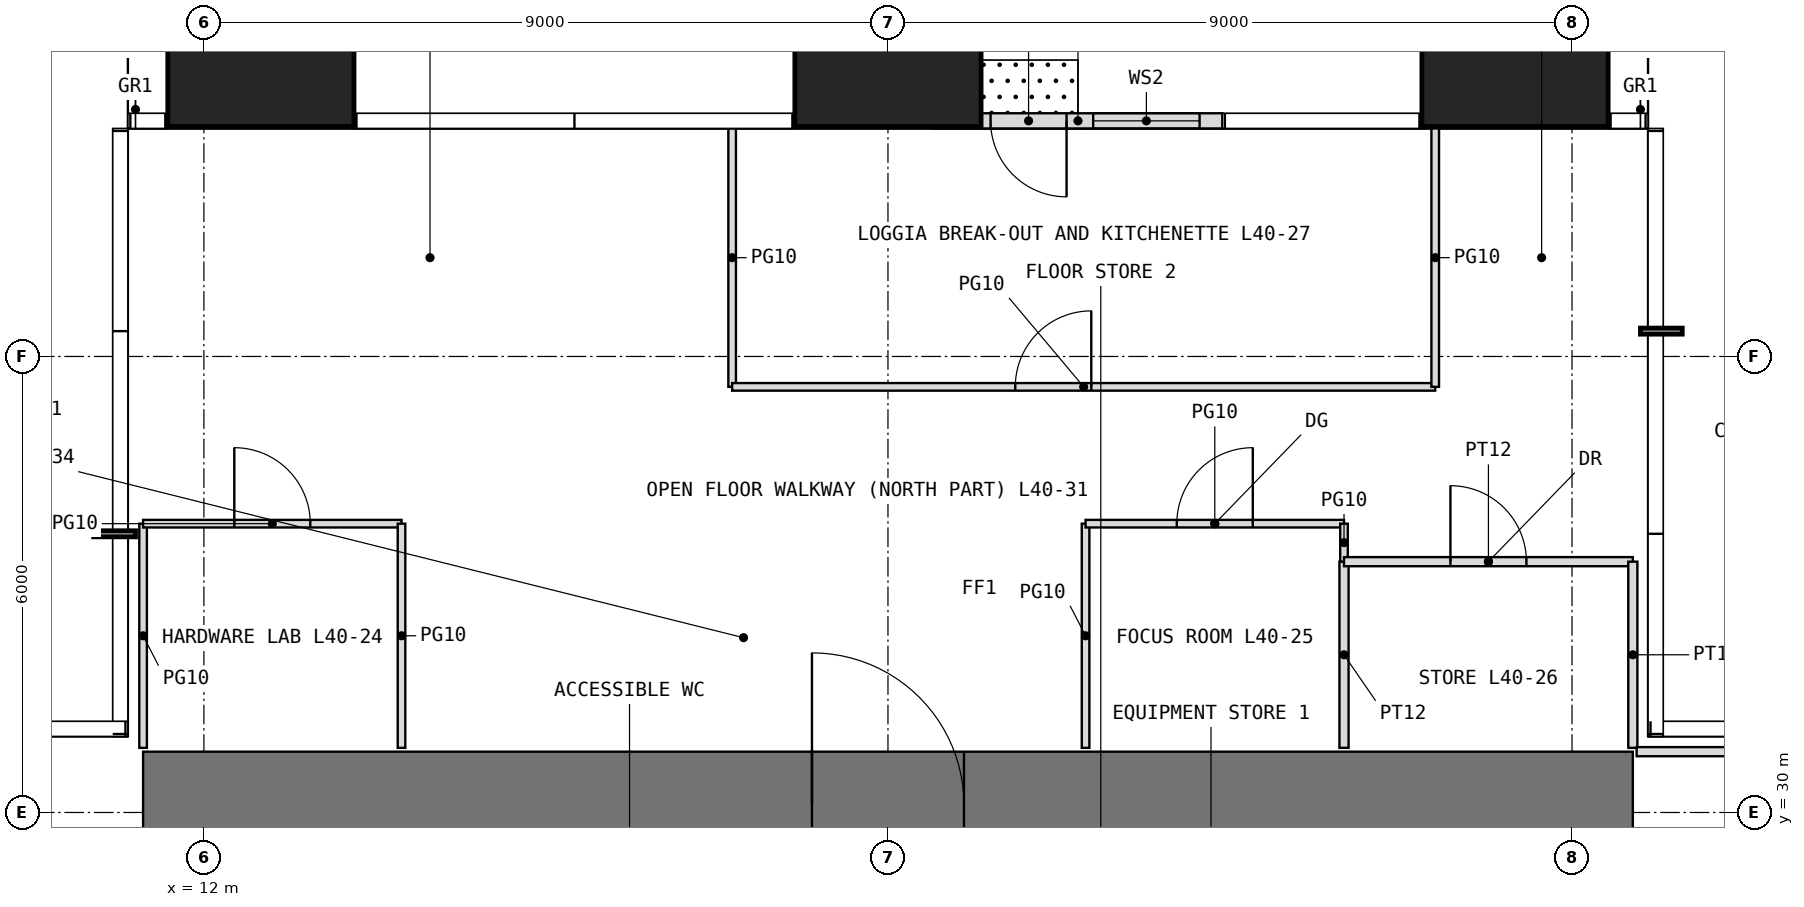
"""IFC4 building model, lengths in metres.
Left out: names, types, materials, properties, quantities, classifications, styles, units other than length and angle.
Written with IfcOpenShell. Run it as: python <this file> out.ifc"""

import sys

from ifc_helpers import new_model, si_unit, direction, frame, frame_2d, origin, origin_2d, place, context, subcontext, project, spatial, rectangle, extrude, element, fill, save


model = new_model("IFC4")
c1 = context("Model", 3, precision=1e-05, world=origin(), true_north=direction((0.0, 1.0)))
c2 = subcontext(c1, "Body", "Model", "MODEL_VIEW")
j1 = project(units=[si_unit("LENGTHUNIT", "METRE"), si_unit("PLANEANGLEUNIT", "RADIAN")], contexts=[c1])
p1 = place(None, origin())
s1 = spatial("IfcSite", under=j1, at=p1, CompositionType="ELEMENT")
p2 = place(p1, origin())
s2 = spatial("IfcBuilding", under=s1, at=p2, CompositionType="ELEMENT")
p3 = place(p2, frame((0.0, 0.0, 170.5)))
s3 = spatial("IfcBuildingStorey", under=s2, at=p3, CompositionType="ELEMENT", Elevation=170.5)
for number, where, z_axis, x_axis in (
    (1, (12.75, 40.25, 0.0), (0.0, 0.0, 1.0), (1.0, 0.0, 0.0)),
    (2, (21.0, 40.25, 0.0), (0.0, 0.0, 1.0), (1.0, 0.0, 0.0)),
    (3, (29.25, 40.25, 0.0), (0.0, 0.0, 1.0), (1.0, 0.0, 0.0)),
):
    element("IfcColumn", number, at=place(p3, frame(where, z_axis=z_axis, x_axis=x_axis)), inside=s3, PredefinedType="COLUMN", context=c2, shape_type="SweptSolid", body=[
        extrude(rectangle(XDim=2.45, YDim=2.45, at=origin_2d()), origin(), (0.0, 0.0, 1.0), 4.0),
    ])
p4 = place(p3, frame((25.4, 39.1, 0.0), z_axis=(0.0, 0.0, 1.0), x_axis=(-1.0, 0.0, 0.0)))
e4 = element("IfcWall", 4, at=p4, inside=s3, PredefinedType="USERDEFINED", context=c2, shape_type="SweptSolid", body=[
    extrude(rectangle(XDim=3.8, YDim=0.2, at=frame_2d((1.9, 0.0))), origin(), (0.0, 0.0, 1.0), 3.75),
])
p5 = place(p4, frame((2.05, 0.0, 0.0)))
e5 = element("IfcOpeningElement", 5, at=p5, cuts=e4, PredefinedType="OPENING", context=c2, shape_type="SweptSolid", body=[
    extrude(rectangle(XDim=1.0, YDim=2.4, at=frame_2d((0.5, 1.2))), frame((0.0, 0.11, 0.0), z_axis=(0.0, -1.0, 0.0), x_axis=(1.0, 0.0, 0.0)), (0.0, 0.0, 1.0), 0.22),
])
p6 = place(p4, frame((0.3, 0.0, 0.3)))
e6 = element("IfcOpeningElement", 6, at=p6, cuts=e4, PredefinedType="OPENING", context=c2, shape_type="SweptSolid", body=[
    extrude(rectangle(XDim=1.4, YDim=2.7, at=frame_2d((0.7, 1.35))), frame((0.0, 0.11, 0.0), z_axis=(0.0, -1.0, 0.0), x_axis=(1.0, 0.0, 0.0)), (0.0, 0.0, 1.0), 0.22),
])
p7 = place(p3, frame((11.2, 30.1, -0.05), z_axis=(0.0, 0.0, 1.0), x_axis=(1.0, 0.0, 0.0)))
e7 = element("IfcWall", 7, at=p7, inside=s3, PredefinedType="SHEAR", context=c2, shape_type="SweptSolid", body=[
    extrude(rectangle(XDim=19.6, YDim=1.4, at=frame_2d((9.8, 0.0))), origin(), (0.0, 0.0, 1.0), 4.0),
])
p8 = place(p7, frame((8.8, 0.0, 0.05)))
e8 = element("IfcOpeningElement", 8, at=p8, cuts=e7, PredefinedType="OPENING", context=c2, shape_type="SweptSolid", body=[
    extrude(rectangle(XDim=2.0, YDim=2.2, at=frame_2d((1.0, 1.1))), frame((0.0, 0.71, 0.0), z_axis=(0.0, -1.0, 0.0), x_axis=(1.0, 0.0, 0.0)), (0.0, 0.0, 1.0), 1.42),
])
p9 = place(p3, frame((11.2, 30.85, 0.0), z_axis=(0.0, 0.0, 1.0), x_axis=(0.0, 1.0, 0.0)))
e9 = element("IfcWall", 9, at=p9, inside=s3, PredefinedType="PARTITIONING", context=c2, shape_type="SweptSolid", body=[
    extrude(rectangle(XDim=2.95, YDim=0.1, at=frame_2d((1.475, 0.0))), origin(), (0.0, 0.0, 1.0), 3.75),
])
p10 = place(p3, frame((11.2, 33.8, 0.0), z_axis=(0.0, 0.0, 1.0), x_axis=(1.0, 0.0, 0.0)))
e10 = element("IfcWall", 10, at=p10, inside=s3, PredefinedType="PARTITIONING", context=c2, shape_type="SweptSolid", body=[
    extrude(rectangle(XDim=3.4, YDim=0.1, at=frame_2d((1.7, 0.0))), origin(), (0.0, 0.0, 1.0), 3.75),
])
p11 = place(p10, frame((1.2, 0.0, 0.0)))
e11 = element("IfcOpeningElement", 11, at=p11, cuts=e10, PredefinedType="OPENING", context=c2, shape_type="SweptSolid", body=[
    extrude(rectangle(XDim=1.0, YDim=2.4, at=frame_2d((0.5, 1.2))), frame((0.0, 0.06, 0.0), z_axis=(0.0, -1.0, 0.0), x_axis=(1.0, 0.0, 0.0)), (0.0, 0.0, 1.0), 0.12),
])
p12 = place(p3, frame((14.6, 30.85, 0.0), z_axis=(0.0, 0.0, 1.0), x_axis=(0.0, 1.0, 0.0)))
e12 = element("IfcWall", 12, at=p12, inside=s3, PredefinedType="PARTITIONING", context=c2, shape_type="SweptSolid", body=[
    extrude(rectangle(XDim=2.95, YDim=0.1, at=frame_2d((1.475, 0.0))), origin(), (0.0, 0.0, 1.0), 3.75),
])
p13 = place(p3, frame((18.95, 35.6, 0.0), z_axis=(0.0, 0.0, 1.0), x_axis=(0.0, 1.0, 0.0)))
e13 = element("IfcWall", 13, at=p13, inside=s3, PredefinedType="PARTITIONING", context=c2, shape_type="SweptSolid", body=[
    extrude(rectangle(XDim=3.4, YDim=0.1, at=frame_2d((1.7, 0.0))), origin(), (0.0, 0.0, 1.0), 3.75),
])
p14 = place(p3, frame((18.95, 35.6, 0.0), z_axis=(0.0, 0.0, 1.0), x_axis=(1.0, 0.0, 0.0)))
e14 = element("IfcWall", 14, at=p14, inside=s3, PredefinedType="PARTITIONING", context=c2, shape_type="SweptSolid", body=[
    extrude(rectangle(XDim=9.25, YDim=0.1, at=frame_2d((4.625, 0.0))), origin(), (0.0, 0.0, 1.0), 3.75),
])
p15 = place(p14, frame((3.725, 0.0, 0.0)))
e15 = element("IfcOpeningElement", 15, at=p15, cuts=e14, PredefinedType="OPENING", context=c2, shape_type="SweptSolid", body=[
    extrude(rectangle(XDim=1.0, YDim=2.4, at=frame_2d((0.5, 1.2))), frame((0.0, 0.06, 0.0), z_axis=(0.0, -1.0, 0.0), x_axis=(1.0, 0.0, 0.0)), (0.0, 0.0, 1.0), 0.12),
])
p16 = place(p3, frame((23.6, 30.85, 0.0), z_axis=(0.0, 0.0, 1.0), x_axis=(0.0, 1.0, 0.0)))
e16 = element("IfcWall", 16, at=p16, inside=s3, PredefinedType="PARTITIONING", context=c2, shape_type="SweptSolid", body=[
    extrude(rectangle(XDim=2.95, YDim=0.1, at=frame_2d((1.475, 0.0))), origin(), (0.0, 0.0, 1.0), 3.75),
])
p17 = place(p3, frame((23.6, 33.8, 0.0), z_axis=(0.0, 0.0, 1.0), x_axis=(1.0, 0.0, 0.0)))
e17 = element("IfcWall", 17, at=p17, inside=s3, PredefinedType="PARTITIONING", context=c2, shape_type="SweptSolid", body=[
    extrude(rectangle(XDim=3.4, YDim=0.1, at=frame_2d((1.7, 0.0))), origin(), (0.0, 0.0, 1.0), 3.75),
])
p18 = place(p17, frame((1.2, 0.0, 0.0)))
e18 = element("IfcOpeningElement", 18, at=p18, cuts=e17, PredefinedType="OPENING", context=c2, shape_type="SweptSolid", body=[
    extrude(rectangle(XDim=1.0, YDim=2.4, at=frame_2d((0.5, 1.2))), frame((0.0, 0.06, 0.0), z_axis=(0.0, -1.0, 0.0), x_axis=(1.0, 0.0, 0.0)), (0.0, 0.0, 1.0), 0.12),
])
p19 = place(p3, frame((27.0, 30.85, 0.0), z_axis=(0.0, 0.0, 1.0), x_axis=(0.0, 1.0, 0.0)))
e19 = element("IfcWall", 19, at=p19, inside=s3, PredefinedType="PARTITIONING", context=c2, shape_type="SweptSolid", body=[
    extrude(rectangle(XDim=2.45, YDim=0.12, at=frame_2d((1.225, 0.0))), origin(), (0.0, 0.0, 1.0), 3.75),
])
p20 = place(p3, frame((27.0, 33.3, 0.0), z_axis=(0.0, 0.0, 1.0), x_axis=(0.0, 1.0, 0.0)))
e20 = element("IfcWall", 20, at=p20, inside=s3, PredefinedType="PARTITIONING", context=c2, shape_type="SweptSolid", body=[
    extrude(rectangle(XDim=0.5, YDim=0.1, at=frame_2d((0.25, 0.0))), origin(), (0.0, 0.0, 1.0), 3.75),
])
p21 = place(p3, frame((27.0, 33.3, 0.0), z_axis=(0.0, 0.0, 1.0), x_axis=(1.0, 0.0, 0.0)))
e21 = element("IfcWall", 21, at=p21, inside=s3, PredefinedType="PARTITIONING", context=c2, shape_type="SweptSolid", body=[
    extrude(rectangle(XDim=3.8, YDim=0.12, at=frame_2d((1.9, 0.0))), origin(), (0.0, 0.0, 1.0), 3.75),
])
p22 = place(p21, frame((1.4, 0.0, 0.0)))
e22 = element("IfcOpeningElement", 22, at=p22, cuts=e21, PredefinedType="OPENING", context=c2, shape_type="SweptSolid", body=[
    extrude(rectangle(XDim=1.0, YDim=2.2, at=frame_2d((0.5, 1.1))), frame((0.0, 0.07, 0.0), z_axis=(0.0, -1.0, 0.0), x_axis=(1.0, 0.0, 0.0)), (0.0, 0.0, 1.0), 0.14),
])
p23 = place(p3, frame((28.2, 35.6, 0.0), z_axis=(0.0, 0.0, 1.0), x_axis=(0.0, 1.0, 0.0)))
e23 = element("IfcWall", 23, at=p23, inside=s3, PredefinedType="PARTITIONING", context=c2, shape_type="SweptSolid", body=[
    extrude(rectangle(XDim=3.4, YDim=0.1, at=frame_2d((1.7, 0.0))), origin(), (0.0, 0.0, 1.0), 3.75),
])
p24 = place(p3, frame((30.8, 30.85, 0.0), z_axis=(0.0, 0.0, 1.0), x_axis=(0.0, 1.0, 0.0)))
e24 = element("IfcWall", 24, at=p24, inside=s3, PredefinedType="PARTITIONING", context=c2, shape_type="SweptSolid", body=[
    extrude(rectangle(XDim=2.45, YDim=0.12, at=frame_2d((1.225, 0.0))), origin(), (0.0, 0.0, 1.0), 3.75),
])
p25 = place(p3, frame((30.85, 30.8, 0.0), z_axis=(0.0, 0.0, 1.0), x_axis=(1.0, 0.0, 0.0)))
e25 = element("IfcWall", 25, at=p25, inside=s3, PredefinedType="PARTITIONING", context=c2, shape_type="SweptSolid", body=[
    extrude(rectangle(XDim=4.85, YDim=0.12, at=frame_2d((2.425, 0.0))), origin(), (0.0, 0.0, 1.0), 3.75),
])
p26 = place(p5, origin())
e26 = element("IfcDoor", 26, at=p26, inside=s3, OperationType="SINGLE_SWING_LEFT", PredefinedType="DOOR", context=c2, shape_type="SweptSolid", body=[
    extrude(rectangle(XDim=1.0, YDim=2.4, at=frame_2d((0.5, 1.2))), frame((0.0, 0.025, 0.0), z_axis=(0.0, -1.0, 0.0), x_axis=(1.0, 0.0, 0.0)), (0.0, 0.0, 1.0), 0.05),
])
fill(e5, e26)
p27 = place(p6, origin())
e27 = element("IfcWindow", 27, at=p27, inside=s3, PartitioningType="SINGLE_PANEL", PredefinedType="WINDOW", context=c2, shape_type="SweptSolid", body=[
    extrude(rectangle(XDim=1.4, YDim=2.7, at=frame_2d((0.7, 1.35))), frame((0.0, 0.03, 0.0), z_axis=(0.0, -1.0, 0.0), x_axis=(1.0, 0.0, 0.0)), (0.0, 0.0, 1.0), 0.06),
])
fill(e6, e27)
p28 = place(p8, origin())
e28 = element("IfcDoor", 28, at=p28, inside=s3, OperationType="DOUBLE_DOOR_SINGLE_SWING", PredefinedType="DOOR", context=c2, shape_type="SweptSolid", body=[
    extrude(rectangle(XDim=2.0, YDim=2.2, at=frame_2d((1.0, 1.1))), frame((0.0, 0.025, 0.0), z_axis=(0.0, -1.0, 0.0), x_axis=(1.0, 0.0, 0.0)), (0.0, 0.0, 1.0), 0.05),
])
fill(e8, e28)
p29 = place(p11, origin())
e29 = element("IfcDoor", 29, at=p29, inside=s3, OperationType="SINGLE_SWING_LEFT", PredefinedType="DOOR", context=c2, shape_type="SweptSolid", body=[
    extrude(rectangle(XDim=1.0, YDim=2.4, at=frame_2d((0.5, 1.2))), frame((0.0, 0.025, 0.0), z_axis=(0.0, -1.0, 0.0), x_axis=(1.0, 0.0, 0.0)), (0.0, 0.0, 1.0), 0.05),
])
fill(e11, e29)
p30 = place(p18, origin())
e30 = element("IfcDoor", 30, at=p30, inside=s3, OperationType="SINGLE_SWING_RIGHT", PredefinedType="DOOR", context=c2, shape_type="SweptSolid", body=[
    extrude(rectangle(XDim=1.0, YDim=2.4, at=frame_2d((0.5, 1.2))), frame((0.0, 0.025, 0.0), z_axis=(0.0, -1.0, 0.0), x_axis=(1.0, 0.0, 0.0)), (0.0, 0.0, 1.0), 0.05),
])
fill(e18, e30)
p31 = place(p22, origin())
e31 = element("IfcDoor", 31, at=p31, inside=s3, OperationType="SINGLE_SWING_LEFT", PredefinedType="DOOR", context=c2, shape_type="SweptSolid", body=[
    extrude(rectangle(XDim=1.0, YDim=2.2, at=frame_2d((0.5, 1.1))), frame((0.0, 0.025, 0.0), z_axis=(0.0, -1.0, 0.0), x_axis=(1.0, 0.0, 0.0)), (0.0, 0.0, 1.0), 0.05),
])
fill(e22, e31)
p32 = place(p15, origin())
e32 = element("IfcDoor", 32, at=p32, inside=s3, OperationType="SINGLE_SWING_RIGHT", PredefinedType="DOOR", context=c2, shape_type="SweptSolid", body=[
    extrude(rectangle(XDim=1.0, YDim=2.4, at=frame_2d((0.5, 1.2))), frame((0.0, 0.025, 0.0), z_axis=(0.0, -1.0, 0.0), x_axis=(1.0, 0.0, 0.0)), (0.0, 0.0, 1.0), 0.05),
])
fill(e15, e32)
save(model, sys.argv[1])
